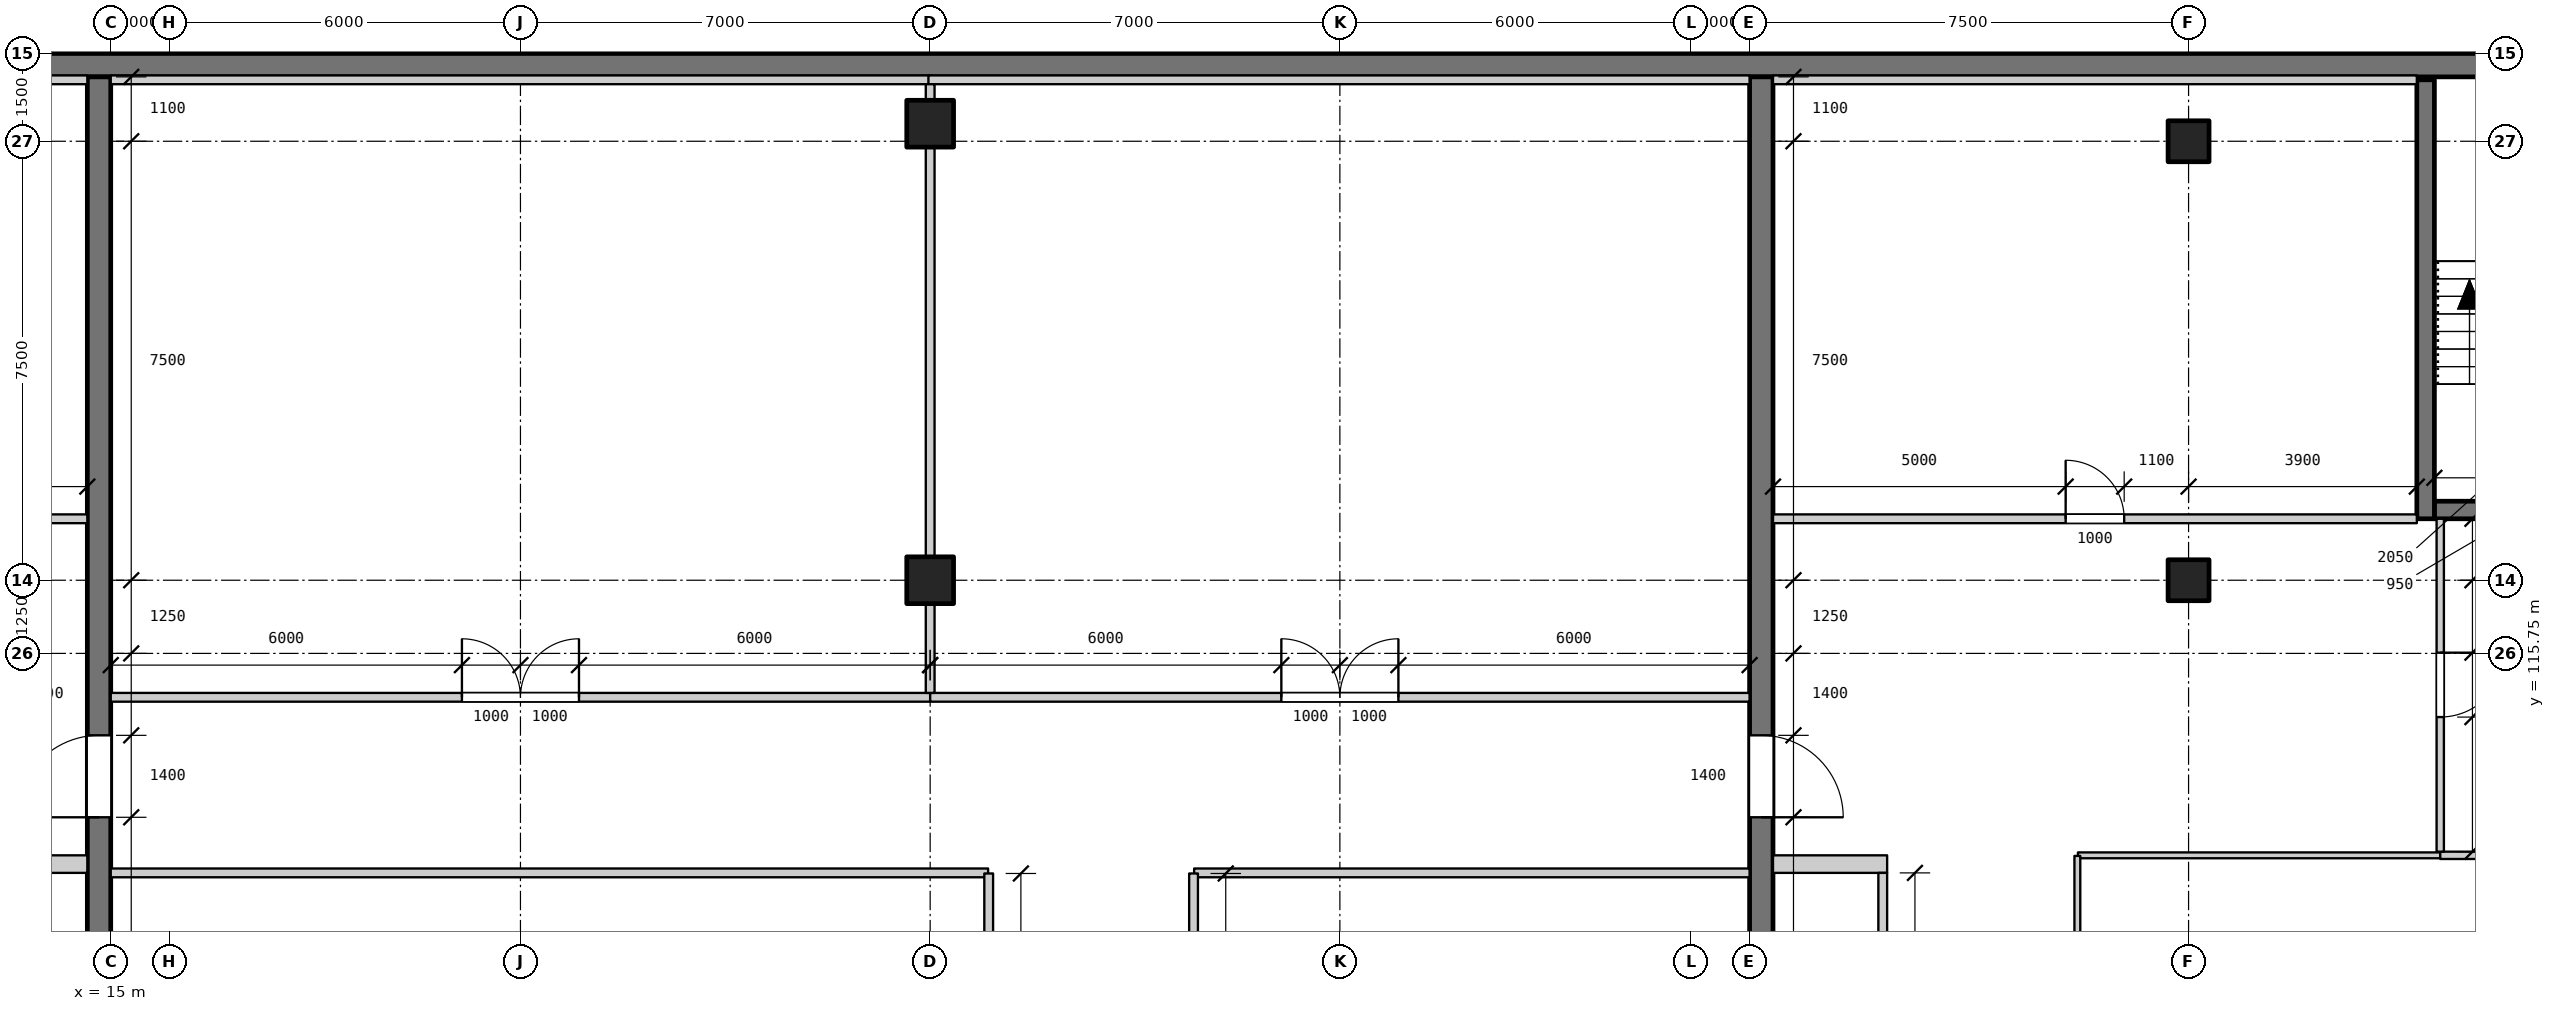
"""IFC4 building model, lengths in metres.
Left out: names, types, materials, properties, quantities, classifications, styles, units other than length and angle.
Written with IfcOpenShell. Run it as: python <this file> out.ifc"""

import sys

from ifc_helpers import new_model, si_unit, direction, frame, frame_2d, origin, origin_2d, place, context, subcontext, project, spatial, rectangle, extrude, element, fill, save


model = new_model("IFC4")
c1 = context("Model", 3, precision=1e-05, world=origin(), true_north=direction((0.0, 1.0)))
c2 = subcontext(c1, "Body", "Model", "MODEL_VIEW")
j1 = project(units=[si_unit("LENGTHUNIT", "METRE"), si_unit("PLANEANGLEUNIT", "RADIAN")], contexts=[c1])
p1 = place(None, origin())
s1 = spatial("IfcSite", under=j1, at=p1, CompositionType="ELEMENT")
p2 = place(p1, origin())
s2 = spatial("IfcBuilding", under=s1, at=p2, CompositionType="ELEMENT")
p3 = place(p2, frame((0.0, 0.0, -10.0)))
s3 = spatial("IfcBuildingStorey", under=s2, at=p3, CompositionType="ELEMENT", Elevation=-10.0)
for number, where, z_axis, x_axis in (
    (1, (50.5, 117.0, -1.4), (0.0, 0.0, 1.0), (1.0, 0.0, 0.0)),
    (2, (50.5, 124.5, -1.4), (0.0, 0.0, 1.0), (1.0, 0.0, 0.0)),
):
    element("IfcColumn", number, at=place(p3, frame(where, z_axis=z_axis, x_axis=x_axis)), inside=s3, PredefinedType="COLUMN", context=c2, shape_type="SweptSolid", body=[
        extrude(rectangle(XDim=0.7, YDim=0.7, at=origin_2d()), origin(), (0.0, 0.0, 1.0), 6.4),
    ])
for number, where, z_axis, x_axis in (
    (3, (29.0, 117.0, -1.4), (0.0, 0.0, 1.0), (1.0, 0.0, 0.0)),
    (4, (29.0, 124.8, -1.4), (0.0, 0.0, 1.0), (1.0, 0.0, 0.0)),
):
    element("IfcColumn", number, at=place(p3, frame(where, z_axis=z_axis, x_axis=x_axis)), inside=s3, PredefinedType="COLUMN", context=c2, shape_type="SweptSolid", body=[
        extrude(rectangle(XDim=0.8, YDim=0.8, at=origin_2d()), origin(), (0.0, 0.0, 1.0), 6.4),
    ])
p4 = place(p3, frame((0.4, 125.8, -1.4), z_axis=(0.0, 0.0, 1.0), x_axis=(1.0, 0.0, 0.0)))
e5 = element("IfcWall", 5, at=p4, inside=s3, PredefinedType="SOLIDWALL", context=c2, shape_type="SweptSolid", body=[
    extrude(rectangle(XDim=57.2, YDim=0.4, at=frame_2d((28.6, 0.0))), origin(), (0.0, 0.0, 1.0), 6.4),
])
p5 = place(p3, frame((14.8, 99.0, -1.4), z_axis=(0.0, 0.0, 1.0), x_axis=(0.0, 1.0, 0.0)))
e6 = element("IfcWall", 6, at=p5, inside=s3, PredefinedType="SHEAR", context=c2, shape_type="SweptSolid", body=[
    extrude(rectangle(XDim=26.6, YDim=0.4, at=frame_2d((13.3, 0.0))), origin(), (0.0, 0.0, 1.0), 6.4),
])
p6 = place(p5, frame((13.95, 0.0, 1.4)))
e7 = element("IfcOpeningElement", 7, at=p6, cuts=e6, PredefinedType="OPENING", context=c2, shape_type="SweptSolid", body=[
    extrude(rectangle(XDim=1.4, YDim=2.4, at=frame_2d((0.7, 1.2))), frame((0.0, 0.21, 0.0), z_axis=(0.0, -1.0, 0.0), x_axis=(1.0, 0.0, 0.0)), (0.0, 0.0, 1.0), 0.42),
])
p7 = place(p3, frame((43.2, 99.0, -1.4), z_axis=(0.0, 0.0, 1.0), x_axis=(0.0, 1.0, 0.0)))
e8 = element("IfcWall", 8, at=p7, inside=s3, PredefinedType="SHEAR", context=c2, shape_type="SweptSolid", body=[
    extrude(rectangle(XDim=26.6, YDim=0.4, at=frame_2d((13.3, 0.0))), origin(), (0.0, 0.0, 1.0), 6.4),
])
p8 = place(p7, frame((13.95, 0.0, 1.4)))
e9 = element("IfcOpeningElement", 9, at=p8, cuts=e8, PredefinedType="OPENING", context=c2, shape_type="SweptSolid", body=[
    extrude(rectangle(XDim=1.4, YDim=2.4, at=frame_2d((0.7, 1.2))), frame((0.0, 0.21, 0.0), z_axis=(0.0, -1.0, 0.0), x_axis=(1.0, 0.0, 0.0)), (0.0, 0.0, 1.0), 0.42),
])
p9 = place(p3, frame((54.7, 118.2, 0.0), z_axis=(0.0, 0.0, 1.0), x_axis=(1.0, 0.0, 0.0)))
e10 = element("IfcWall", 10, at=p9, inside=s3, PredefinedType="SHEAR", context=c2, shape_type="SweptSolid", body=[
    extrude(rectangle(XDim=3.0, YDim=0.3, at=frame_2d((1.5, 0.0))), origin(), (0.0, 0.0, 1.0), 5.0),
])
p10 = place(p9, frame((0.95, 0.0, 0.0)))
e11 = element("IfcOpeningElement", 11, at=p10, cuts=e10, PredefinedType="OPENING", context=c2, shape_type="SweptSolid", body=[
    extrude(rectangle(XDim=1.1, YDim=2.1, at=frame_2d((0.55, 1.05))), frame((0.0, 0.16, 0.0), z_axis=(0.0, -1.0, 0.0), x_axis=(1.0, 0.0, 0.0)), (0.0, 0.0, 1.0), 0.32),
])
p11 = place(p3, frame((54.55, 118.05, 0.0), z_axis=(0.0, 0.0, 1.0), x_axis=(0.0, 1.0, 0.0)))
e12 = element("IfcWall", 12, at=p11, inside=s3, PredefinedType="SHEAR", context=c2, shape_type="SweptSolid", body=[
    extrude(rectangle(XDim=7.5, YDim=0.3, at=frame_2d((3.75, 0.0))), origin(), (0.0, 0.0, 1.0), 5.0),
])
for number, where, z_axis, x_axis in (
    (13, (12.65, 112.15, 0.0), (0.0, 0.0, 1.0), (1.0, 0.0, 0.0)),
    (14, (43.4, 112.15, 0.0), (0.0, 0.0, 1.0), (1.0, 0.0, 0.0)),
):
    element("IfcWall", number, at=place(p3, frame(where, z_axis=z_axis, x_axis=x_axis)), inside=s3, PredefinedType="PARTITIONING", context=c2, shape_type="SweptSolid", body=[
        extrude(rectangle(XDim=1.95, YDim=0.3, at=frame_2d((0.975, 0.0))), origin(), (0.0, 0.0, 1.0), 4.75),
    ])
p12 = place(p3, frame((45.275, 108.4, 0.0), z_axis=(0.0, 0.0, 1.0), x_axis=(0.0, 1.0, 0.0)))
e15 = element("IfcWall", 15, at=p12, inside=s3, PredefinedType="PARTITIONING", context=c2, shape_type="SweptSolid", body=[
    extrude(rectangle(XDim=3.6, YDim=0.15, at=frame_2d((1.8, 0.0))), origin(), (0.0, 0.0, 1.0), 4.75),
])
p13 = place(p12, frame((1.35, 0.0, 0.0)))
e16 = element("IfcOpeningElement", 16, at=p13, cuts=e15, PredefinedType="OPENING", context=c2, shape_type="SweptSolid", body=[
    extrude(rectangle(XDim=0.9, YDim=2.1, at=frame_2d((0.45, 1.05))), frame((0.0, 0.085, 0.0), z_axis=(0.0, -1.0, 0.0), x_axis=(1.0, 0.0, 0.0)), (0.0, 0.0, 1.0), 0.17),
])
p14 = place(p3, frame((15.0, 112.0, 0.0), z_axis=(0.0, 0.0, 1.0), x_axis=(1.0, 0.0, 0.0)))
e17 = element("IfcWall", 17, at=p14, inside=s3, PredefinedType="PARTITIONING", context=c2, shape_type="SweptSolid", body=[
    extrude(rectangle(XDim=14.99, YDim=0.15, at=frame_2d((7.495, 0.0))), origin(), (0.0, 0.0, 1.0), 4.75),
])
p15 = place(p3, frame((33.51, 112.0, 0.0), z_axis=(0.0, 0.0, 1.0), x_axis=(1.0, 0.0, 0.0)))
e18 = element("IfcWall", 18, at=p15, inside=s3, PredefinedType="PARTITIONING", context=c2, shape_type="SweptSolid", body=[
    extrude(rectangle(XDim=9.49, YDim=0.15, at=frame_2d((4.745, 0.0))), origin(), (0.0, 0.0, 1.0), 4.75),
])
p16 = place(p3, frame((48.61, 112.3, 0.0), z_axis=(0.0, 0.0, 1.0), x_axis=(1.0, 0.0, 0.0)))
e19 = element("IfcWall", 19, at=p16, inside=s3, PredefinedType="PARTITIONING", context=c2, shape_type="SweptSolid", body=[
    extrude(rectangle(XDim=6.19, YDim=0.1, at=frame_2d((3.095, 0.0))), origin(), (0.0, 0.0, 1.0), 4.75),
])
p17 = place(p3, frame((54.8, 112.3, 0.0), z_axis=(0.0, 0.0, 1.0), x_axis=(1.0, 0.0, 0.0)))
e20 = element("IfcWall", 20, at=p17, inside=s3, PredefinedType="PARTITIONING", context=c2, shape_type="SweptSolid", body=[
    extrude(rectangle(XDim=2.8, YDim=0.125, at=frame_2d((1.4, 0.0))), origin(), (0.0, 0.0, 1.0), 4.75),
])
p18 = place(p3, frame((15.0, 115.0, 0.0), z_axis=(0.0, 0.0, 1.0), x_axis=(1.0, 0.0, 0.0)))
e21 = element("IfcWall", 21, at=p18, inside=s3, PredefinedType="PARTITIONING", context=c2, shape_type="SweptSolid", body=[
    extrude(rectangle(XDim=14.0, YDim=0.15, at=frame_2d((7.0, 0.0))), origin(), (0.0, 0.0, 1.0), 4.75),
])
p19 = place(p18, frame((6.0, 0.0, 0.0)))
e22 = element("IfcOpeningElement", 22, at=p19, cuts=e21, PredefinedType="OPENING", context=c2, shape_type="SweptSolid", body=[
    extrude(rectangle(XDim=2.0, YDim=2.4, at=frame_2d((1.0, 1.2))), frame((0.0, 0.085, 0.0), z_axis=(0.0, -1.0, 0.0), x_axis=(1.0, 0.0, 0.0)), (0.0, 0.0, 1.0), 0.17),
])
p20 = place(p3, frame((29.0, 115.0, 0.0), z_axis=(0.0, 0.0, 1.0), x_axis=(1.0, 0.0, 0.0)))
e23 = element("IfcWall", 23, at=p20, inside=s3, PredefinedType="PARTITIONING", context=c2, shape_type="SweptSolid", body=[
    extrude(rectangle(XDim=14.0, YDim=0.15, at=frame_2d((7.0, 0.0))), origin(), (0.0, 0.0, 1.0), 4.75),
])
p21 = place(p20, frame((6.0, 0.0, 0.0)))
e24 = element("IfcOpeningElement", 24, at=p21, cuts=e23, PredefinedType="OPENING", context=c2, shape_type="SweptSolid", body=[
    extrude(rectangle(XDim=2.0, YDim=2.4, at=frame_2d((1.0, 1.2))), frame((0.0, 0.085, 0.0), z_axis=(0.0, -1.0, 0.0), x_axis=(1.0, 0.0, 0.0)), (0.0, 0.0, 1.0), 0.17),
])
p22 = place(p3, frame((3.6, 118.05, 0.0), z_axis=(0.0, 0.0, 1.0), x_axis=(1.0, 0.0, 0.0)))
e25 = element("IfcWall", 25, at=p22, inside=s3, PredefinedType="PARTITIONING", context=c2, shape_type="SweptSolid", body=[
    extrude(rectangle(XDim=11.0, YDim=0.15, at=frame_2d((5.5, 0.0))), origin(), (0.0, 0.0, 1.0), 4.75),
])
p23 = place(p22, frame((5.0, 0.0, 0.0)))
e26 = element("IfcOpeningElement", 26, at=p23, cuts=e25, PredefinedType="OPENING", context=c2, shape_type="SweptSolid", body=[
    extrude(rectangle(XDim=1.0, YDim=2.1, at=frame_2d((0.5, 1.05))), frame((0.0, 0.085, 0.0), z_axis=(0.0, -1.0, 0.0), x_axis=(1.0, 0.0, 0.0)), (0.0, 0.0, 1.0), 0.17),
])
p24 = place(p3, frame((43.4, 118.05, 0.0), z_axis=(0.0, 0.0, 1.0), x_axis=(1.0, 0.0, 0.0)))
e27 = element("IfcWall", 27, at=p24, inside=s3, PredefinedType="PARTITIONING", context=c2, shape_type="SweptSolid", body=[
    extrude(rectangle(XDim=11.0, YDim=0.15, at=frame_2d((5.5, 0.0))), origin(), (0.0, 0.0, 1.0), 4.75),
])
p25 = place(p24, frame((5.0, 0.0, 0.0)))
e28 = element("IfcOpeningElement", 28, at=p25, cuts=e27, PredefinedType="OPENING", context=c2, shape_type="SweptSolid", body=[
    extrude(rectangle(XDim=1.0, YDim=2.1, at=frame_2d((0.5, 1.05))), frame((0.0, 0.085, 0.0), z_axis=(0.0, -1.0, 0.0), x_axis=(1.0, 0.0, 0.0)), (0.0, 0.0, 1.0), 0.17),
])
p26 = place(p3, frame((3.6, 125.55, 0.0), z_axis=(0.0, 0.0, 1.0), x_axis=(1.0, 0.0, 0.0)))
e29 = element("IfcWall", 29, at=p26, inside=s3, PredefinedType="PARTITIONING", context=c2, shape_type="SweptSolid", body=[
    extrude(rectangle(XDim=11.0, YDim=0.15, at=frame_2d((5.5, 0.0))), origin(), (0.0, 0.0, 1.0), 4.75),
])
for number, where, z_axis, x_axis in (
    (30, (15.0, 125.55, 0.0), (0.0, 0.0, 1.0), (1.0, 0.0, 0.0)),
    (31, (28.97, 125.55, 0.0), (0.0, 0.0, 1.0), (1.0, 0.0, 0.0)),
):
    element("IfcWall", number, at=place(p3, frame(where, z_axis=z_axis, x_axis=x_axis)), inside=s3, PredefinedType="PARTITIONING", context=c2, shape_type="SweptSolid", body=[
        extrude(rectangle(XDim=14.03, YDim=0.15, at=frame_2d((7.015, 0.0))), origin(), (0.0, 0.0, 1.0), 4.75),
    ])
p27 = place(p3, frame((43.4, 125.55, 0.0), z_axis=(0.0, 0.0, 1.0), x_axis=(1.0, 0.0, 0.0)))
e32 = element("IfcWall", 32, at=p27, inside=s3, PredefinedType="PARTITIONING", context=c2, shape_type="SweptSolid", body=[
    extrude(rectangle(XDim=11.0, YDim=0.15, at=frame_2d((5.5, 0.0))), origin(), (0.0, 0.0, 1.0), 4.75),
])
p28 = place(p3, frame((29.0, 115.075, 0.0), z_axis=(0.0, 0.0, 1.0), x_axis=(0.0, 1.0, 0.0)))
e33 = element("IfcWall", 33, at=p28, inside=s3, PredefinedType="PARTITIONING", context=c2, shape_type="SweptSolid", body=[
    extrude(rectangle(XDim=1.525, YDim=0.15, at=frame_2d((0.763, 0.0))), origin(), (0.0, 0.0, 1.0), 3.65),
])
p29 = place(p3, frame((29.0, 117.4, 0.0), z_axis=(0.0, 0.0, 1.0), x_axis=(0.0, 1.0, 0.0)))
e34 = element("IfcWall", 34, at=p29, inside=s3, PredefinedType="PARTITIONING", context=c2, shape_type="SweptSolid", body=[
    extrude(rectangle(XDim=7.0, YDim=0.15, at=frame_2d((3.5, 0.0))), origin(), (0.0, 0.0, 1.0), 3.65),
])
p30 = place(p3, frame((29.0, 125.2, 0.0), z_axis=(0.0, 0.0, 1.0), x_axis=(0.0, 1.0, 0.0)))
e35 = element("IfcWall", 35, at=p30, inside=s3, PredefinedType="PARTITIONING", context=c2, shape_type="SweptSolid", body=[
    extrude(rectangle(XDim=0.275, YDim=0.15, at=frame_2d((0.138, 0.0))), origin(), (0.0, 0.0, 1.0), 4.75),
])
p31 = place(p3, frame((30.0, 99.0, 0.0), z_axis=(0.0, 0.0, 1.0), x_axis=(0.0, 1.0, 0.0)))
e36 = element("IfcWall", 36, at=p31, inside=s3, PredefinedType="PARTITIONING", context=c2, shape_type="SweptSolid", body=[
    extrude(rectangle(XDim=12.99, YDim=0.15, at=frame_2d((6.495, 0.0))), origin(), (0.0, 0.0, 1.0), 4.75),
])
p32 = place(p31, frame((5.5, 0.0, 0.0)))
e37 = element("IfcOpeningElement", 37, at=p32, cuts=e36, PredefinedType="OPENING", context=c2, shape_type="SweptSolid", body=[
    extrude(rectangle(XDim=2.0, YDim=2.4, at=frame_2d((1.0, 1.2))), frame((0.0, 0.085, 0.0), z_axis=(0.0, -1.0, 0.0), x_axis=(1.0, 0.0, 0.0)), (0.0, 0.0, 1.0), 0.17),
])
p33 = place(p3, frame((33.5, 99.0, 0.0), z_axis=(0.0, 0.0, 1.0), x_axis=(0.0, 1.0, 0.0)))
e38 = element("IfcWall", 38, at=p33, inside=s3, PredefinedType="PARTITIONING", context=c2, shape_type="SweptSolid", body=[
    extrude(rectangle(XDim=12.99, YDim=0.15, at=frame_2d((6.495, 0.0))), origin(), (0.0, 0.0, 1.0), 4.75),
])
p34 = place(p33, frame((5.5, 0.0, 0.0)))
e39 = element("IfcOpeningElement", 39, at=p34, cuts=e38, PredefinedType="OPENING", context=c2, shape_type="SweptSolid", body=[
    extrude(rectangle(XDim=2.0, YDim=2.4, at=frame_2d((1.0, 1.2))), frame((0.0, 0.085, 0.0), z_axis=(0.0, -1.0, 0.0), x_axis=(1.0, 0.0, 0.0)), (0.0, 0.0, 1.0), 0.17),
])
p35 = place(p3, frame((48.6, 108.975, 0.0), z_axis=(0.0, 0.0, 1.0), x_axis=(0.0, 1.0, 0.0)))
e40 = element("IfcWall", 40, at=p35, inside=s3, PredefinedType="PARTITIONING", context=c2, shape_type="SweptSolid", body=[
    extrude(rectangle(XDim=3.315, YDim=0.1, at=frame_2d((1.657, 0.0))), origin(), (0.0, 0.0, 1.0), 4.75),
])
p36 = place(p3, frame((54.8, 112.363, 0.0), z_axis=(0.0, 0.0, 1.0), x_axis=(0.0, 1.0, 0.0)))
e41 = element("IfcWall", 41, at=p36, inside=s3, PredefinedType="PARTITIONING", context=c2, shape_type="SweptSolid", body=[
    extrude(rectangle(XDim=5.688, YDim=0.125, at=frame_2d((2.844, 0.0))), origin(), (0.0, 0.0, 1.0), 4.75),
])
p37 = place(p36, frame((2.3, 0.0, 0.0)))
e42 = element("IfcOpeningElement", 42, at=p37, cuts=e41, PredefinedType="OPENING", context=c2, shape_type="SweptSolid", body=[
    extrude(rectangle(XDim=1.1, YDim=2.1, at=frame_2d((0.55, 1.05))), frame((0.0, 0.073, 0.0), z_axis=(0.0, -1.0, 0.0), x_axis=(1.0, 0.0, 0.0)), (0.0, 0.0, 1.0), 0.145),
])
p38 = place(p6, origin())
e43 = element("IfcDoor", 43, at=p38, inside=s3, OperationType="SINGLE_SWING_LEFT", PredefinedType="DOOR", context=c2, shape_type="SweptSolid", body=[
    extrude(rectangle(XDim=1.4, YDim=2.4, at=frame_2d((0.7, 1.2))), frame((0.0, 0.025, 0.0), z_axis=(0.0, -1.0, 0.0), x_axis=(1.0, 0.0, 0.0)), (0.0, 0.0, 1.0), 0.05),
])
fill(e7, e43)
p39 = place(p8, frame((1.4, 0.0, 0.0), z_axis=(0.0, 0.0, 1.0), x_axis=(-1.0, 0.0, 0.0)))
e44 = element("IfcDoor", 44, at=p39, inside=s3, OperationType="SINGLE_SWING_RIGHT", PredefinedType="DOOR", context=c2, shape_type="SweptSolid", body=[
    extrude(rectangle(XDim=1.4, YDim=2.4, at=frame_2d((0.7, 1.2))), frame((0.0, 0.025, 0.0), z_axis=(0.0, -1.0, 0.0), x_axis=(1.0, 0.0, 0.0)), (0.0, 0.0, 1.0), 0.05),
])
fill(e9, e44)
p40 = place(p19, origin())
e45 = element("IfcDoor", 45, at=p40, inside=s3, OperationType="DOUBLE_DOOR_SINGLE_SWING", PredefinedType="DOOR", context=c2, shape_type="SweptSolid", body=[
    extrude(rectangle(XDim=2.0, YDim=2.4, at=frame_2d((1.0, 1.2))), frame((0.0, 0.025, 0.0), z_axis=(0.0, -1.0, 0.0), x_axis=(1.0, 0.0, 0.0)), (0.0, 0.0, 1.0), 0.05),
])
fill(e22, e45)
p41 = place(p21, origin())
e46 = element("IfcDoor", 46, at=p41, inside=s3, OperationType="DOUBLE_DOOR_SINGLE_SWING", PredefinedType="DOOR", context=c2, shape_type="SweptSolid", body=[
    extrude(rectangle(XDim=2.0, YDim=2.4, at=frame_2d((1.0, 1.2))), frame((0.0, 0.025, 0.0), z_axis=(0.0, -1.0, 0.0), x_axis=(1.0, 0.0, 0.0)), (0.0, 0.0, 1.0), 0.05),
])
fill(e24, e46)
p42 = place(p37, frame((1.1, 0.0, 0.0), z_axis=(0.0, 0.0, 1.0), x_axis=(-1.0, 0.0, 0.0)))
e47 = element("IfcDoor", 47, at=p42, inside=s3, OperationType="SINGLE_SWING_LEFT", PredefinedType="DOOR", context=c2, shape_type="SweptSolid", body=[
    extrude(rectangle(XDim=1.1, YDim=2.1, at=frame_2d((0.55, 1.05))), frame((0.0, 0.025, 0.0), z_axis=(0.0, -1.0, 0.0), x_axis=(1.0, 0.0, 0.0)), (0.0, 0.0, 1.0), 0.05),
])
fill(e42, e47)
p43 = place(p25, origin())
e48 = element("IfcDoor", 48, at=p43, inside=s3, OperationType="SINGLE_SWING_LEFT", PredefinedType="DOOR", context=c2, shape_type="SweptSolid", body=[
    extrude(rectangle(XDim=1.0, YDim=2.1, at=frame_2d((0.5, 1.05))), frame((0.0, 0.025, 0.0), z_axis=(0.0, -1.0, 0.0), x_axis=(1.0, 0.0, 0.0)), (0.0, 0.0, 1.0), 0.05),
])
fill(e28, e48)
save(model, sys.argv[1])
